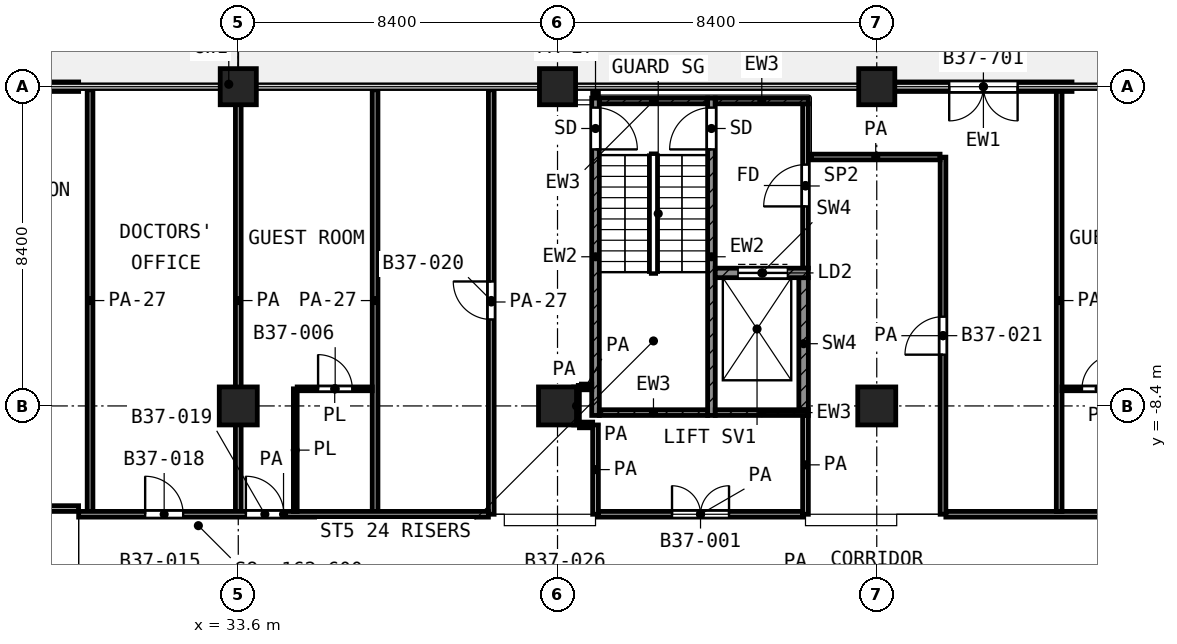
"""IFC4 building model, lengths in metres.
Left out: names, types, materials, properties, quantities, classifications, styles, units other than length and angle.
Written with IfcOpenShell. Run it as: python <this file> out.ifc"""

import sys

from ifc_helpers import new_model, si_unit, direction, frame, frame_2d, origin, origin_2d, place, context, subcontext, project, spatial, rectangle, extrude, element, fill, save


model = new_model("IFC4")
c1 = context("Model", 3, precision=1e-05, world=origin(), true_north=direction((0.0, 1.0)))
c2 = subcontext(c1, "Body", "Model", "MODEL_VIEW")
j1 = project(units=[si_unit("LENGTHUNIT", "METRE"), si_unit("PLANEANGLEUNIT", "RADIAN")], contexts=[c1])
p1 = place(None, origin())
s1 = spatial("IfcSite", under=j1, at=p1, CompositionType="ELEMENT")
p2 = place(p1, origin())
s2 = spatial("IfcBuilding", under=s1, at=p2, CompositionType="ELEMENT")
p3 = place(p2, frame((0.0, 0.0, 162.6)))
s3 = spatial("IfcBuildingStorey", under=s2, at=p3, CompositionType="ELEMENT", Elevation=162.6)
for number, where, z_axis, x_axis in (
    (1, (33.6, 0.0, 0.0), (0.0, 0.0, 1.0), (1.0, 0.0, 0.0)),
    (2, (42.0, 0.0, 0.0), (0.0, 0.0, 1.0), (1.0, 0.0, 0.0)),
    (3, (50.4, 0.0, 0.0), (0.0, 0.0, 1.0), (1.0, 0.0, 0.0)),
):
    element("IfcColumn", number, at=place(p3, frame(where, z_axis=z_axis, x_axis=x_axis)), inside=s3, PredefinedType="COLUMN", context=c2, shape_type="SweptSolid", body=[
        extrude(rectangle(XDim=0.95, YDim=0.95, at=origin_2d()), origin(), (0.0, 0.0, 1.0), 4.2),
    ])
for number, where, z_axis, x_axis in (
    (4, (33.6, -8.4, 0.0), (0.0, 0.0, 1.0), (1.0, 0.0, 0.0)),
    (5, (42.0, -8.4, 0.0), (0.0, 0.0, 1.0), (1.0, 0.0, 0.0)),
    (6, (50.4, -8.4, 0.0), (0.0, 0.0, 1.0), (1.0, 0.0, 0.0)),
):
    element("IfcColumn", number, at=place(p3, frame(where, z_axis=z_axis, x_axis=x_axis)), inside=s3, PredefinedType="COLUMN", context=c2, shape_type="SweptSolid", body=[
        extrude(rectangle(XDim=1.0, YDim=1.0, at=origin_2d()), origin(), (0.0, 0.0, 1.0), 4.2),
    ])
p4 = place(p3, frame((55.538, 0.0, 0.0), z_axis=(0.0, 0.0, 1.0), x_axis=(-1.0, 0.0, 0.0)))
e7 = element("IfcWall", 7, at=p4, inside=s3, PredefinedType="SOLIDWALL", context=c2, shape_type="SweptSolid", body=[
    extrude(rectangle(XDim=4.663, YDim=0.25, at=frame_2d((2.331, 0.0))), origin(), (0.0, 0.0, 1.0), 2.58),
])
p5 = place(p4, frame((1.431, 0.0, 0.0)))
e8 = element("IfcOpeningElement", 8, at=p5, cuts=e7, PredefinedType="OPENING", context=c2, shape_type="SweptSolid", body=[
    extrude(rectangle(XDim=1.8, YDim=2.1, at=frame_2d((0.9, 1.05))), frame((0.0, 0.135, 0.0), z_axis=(0.0, -1.0, 0.0), x_axis=(1.0, 0.0, 0.0)), (0.0, 0.0, 1.0), 0.27),
])
p6 = place(p3, frame((29.4, 0.0, 0.0), z_axis=(0.0, 0.0, 1.0), x_axis=(-1.0, 0.0, 0.0)))
e9 = element("IfcWall", 9, at=p6, inside=s3, PredefinedType="SOLIDWALL", context=c2, shape_type="SweptSolid", body=[
    extrude(rectangle(XDim=3.725, YDim=0.25, at=frame_2d((1.862, 0.0))), origin(), (0.0, 0.0, 1.0), 2.58),
])
p7 = place(p6, frame((0.962, 0.0, 0.0)))
e10 = element("IfcOpeningElement", 10, at=p7, cuts=e9, PredefinedType="OPENING", context=c2, shape_type="SweptSolid", body=[
    extrude(rectangle(XDim=1.8, YDim=2.1, at=frame_2d((0.9, 1.05))), frame((0.0, 0.135, 0.0), z_axis=(0.0, -1.0, 0.0), x_axis=(1.0, 0.0, 0.0)), (0.0, 0.0, 1.0), 0.27),
])
p8 = place(p3, frame((43.0, -8.65, 0.0), z_axis=(0.0, 0.0, 1.0), x_axis=(0.0, 1.0, 0.0)))
e11 = element("IfcWall", 11, at=p8, inside=s3, PredefinedType="SHEAR", context=c2, shape_type="SweptSolid", body=[
    extrude(rectangle(XDim=8.35, YDim=0.2, at=frame_2d((4.175, 0.0))), origin(), (0.0, 0.0, 1.0), 3.6),
])
p9 = place(p8, frame((7.0, 0.0, 0.0)))
e12 = element("IfcOpeningElement", 12, at=p9, cuts=e11, PredefinedType="OPENING", context=c2, shape_type="SweptSolid", body=[
    extrude(rectangle(XDim=1.1, YDim=2.1, at=frame_2d((0.55, 1.05))), frame((0.0, 0.11, 0.0), z_axis=(0.0, -1.0, 0.0), x_axis=(1.0, 0.0, 0.0)), (0.0, 0.0, 1.0), 0.22),
])
p10 = place(p3, frame((46.05, -8.65, 0.0), z_axis=(0.0, 0.0, 1.0), x_axis=(0.0, 1.0, 0.0)))
e13 = element("IfcWall", 13, at=p10, inside=s3, PredefinedType="SHEAR", context=c2, shape_type="SweptSolid", body=[
    extrude(rectangle(XDim=8.35, YDim=0.2, at=frame_2d((4.175, 0.0))), origin(), (0.0, 0.0, 1.0), 3.6),
])
p11 = place(p10, frame((7.0, 0.0, 0.0)))
e14 = element("IfcOpeningElement", 14, at=p11, cuts=e13, PredefinedType="OPENING", context=c2, shape_type="SweptSolid", body=[
    extrude(rectangle(XDim=1.1, YDim=2.1, at=frame_2d((0.55, 1.05))), frame((0.0, 0.11, 0.0), z_axis=(0.0, -1.0, 0.0), x_axis=(1.0, 0.0, 0.0)), (0.0, 0.0, 1.0), 0.22),
])
p12 = place(p3, frame((43.1, -0.375, 0.0), z_axis=(0.0, 0.0, 1.0), x_axis=(1.0, 0.0, 0.0)))
e15 = element("IfcWall", 15, at=p12, inside=s3, PredefinedType="SHEAR", context=c2, shape_type="SweptSolid", body=[
    extrude(rectangle(XDim=2.85, YDim=0.15, at=frame_2d((1.425, 0.0))), origin(), (0.0, 0.0, 1.0), 3.6),
])
p13 = place(p3, frame((46.15, -0.375, 0.0), z_axis=(0.0, 0.0, 1.0), x_axis=(1.0, 0.0, 0.0)))
e16 = element("IfcWall", 16, at=p13, inside=s3, PredefinedType="SHEAR", context=c2, shape_type="SweptSolid", body=[
    extrude(rectangle(XDim=2.45, YDim=0.15, at=frame_2d((1.225, 0.0))), origin(), (0.0, 0.0, 1.0), 3.6),
])
p14 = place(p3, frame((43.1, -8.575, 0.0), z_axis=(0.0, 0.0, 1.0), x_axis=(1.0, 0.0, 0.0)))
e17 = element("IfcWall", 17, at=p14, inside=s3, PredefinedType="SHEAR", context=c2, shape_type="SweptSolid", body=[
    extrude(rectangle(XDim=2.85, YDim=0.15, at=frame_2d((1.425, 0.0))), origin(), (0.0, 0.0, 1.0), 3.6),
])
p15 = place(p3, frame((46.15, -8.575, 0.0), z_axis=(0.0, 0.0, 1.0), x_axis=(1.0, 0.0, 0.0)))
e18 = element("IfcWall", 18, at=p15, inside=s3, PredefinedType="SHEAR", context=c2, shape_type="SweptSolid", body=[
    extrude(rectangle(XDim=2.45, YDim=0.15, at=frame_2d((1.225, 0.0))), origin(), (0.0, 0.0, 1.0), 3.6),
])
p16 = place(p3, frame((46.15, -4.9, 0.0), z_axis=(0.0, 0.0, 1.0), x_axis=(1.0, 0.0, 0.0)))
e19 = element("IfcWall", 19, at=p16, inside=s3, PredefinedType="SHEAR", context=c2, shape_type="SweptSolid", body=[
    extrude(rectangle(XDim=2.45, YDim=0.25, at=frame_2d((1.225, 0.0))), origin(), (0.0, 0.0, 1.0), 3.6),
])
p17 = place(p16, frame((0.6, 0.0, 0.0)))
e20 = element("IfcOpeningElement", 20, at=p17, cuts=e19, PredefinedType="OPENING", context=c2, shape_type="SweptSolid", body=[
    extrude(rectangle(XDim=1.3, YDim=2.1, at=frame_2d((0.65, 1.05))), frame((0.0, 0.135, 0.0), z_axis=(0.0, -1.0, 0.0), x_axis=(1.0, 0.0, 0.0)), (0.0, 0.0, 1.0), 0.27),
])
p18 = place(p3, frame((48.475, -8.5, 0.0), z_axis=(0.0, 0.0, 1.0), x_axis=(0.0, 1.0, 0.0)))
e21 = element("IfcWall", 21, at=p18, inside=s3, PredefinedType="SHEAR", context=c2, shape_type="SweptSolid", body=[
    extrude(rectangle(XDim=3.475, YDim=0.25, at=frame_2d((1.738, 0.0))), origin(), (0.0, 0.0, 1.0), 3.6),
])
p19 = place(p3, frame((48.525, -4.775, 0.0), z_axis=(0.0, 0.0, 1.0), x_axis=(0.0, 1.0, 0.0)))
e22 = element("IfcWall", 22, at=p19, inside=s3, PredefinedType="PARTITIONING", context=c2, shape_type="SweptSolid", body=[
    extrude(rectangle(XDim=4.325, YDim=0.15, at=frame_2d((2.163, 0.0))), origin(), (0.0, 0.0, 1.0), 3.6),
])
p20 = place(p19, frame((1.625, 0.0, 0.0)))
e23 = element("IfcOpeningElement", 23, at=p20, cuts=e22, PredefinedType="OPENING", context=c2, shape_type="SweptSolid", body=[
    extrude(rectangle(XDim=1.1, YDim=2.1, at=frame_2d((0.55, 1.05))), frame((0.0, 0.085, 0.0), z_axis=(0.0, -1.0, 0.0), x_axis=(1.0, 0.0, 0.0)), (0.0, 0.0, 1.0), 0.17),
])
p21 = place(p3, frame((35.15, -7.95, 0.0), z_axis=(0.0, 0.0, 1.0), x_axis=(1.0, 0.0, 0.0)))
e24 = element("IfcWall", 24, at=p21, inside=s3, PredefinedType="PARTITIONING", context=c2, shape_type="SweptSolid", body=[
    extrude(rectangle(XDim=1.975, YDim=0.1, at=frame_2d((0.988, 0.0))), origin(), (0.0, 0.0, 1.0), 3.6),
])
p22 = place(p21, frame((0.55, 0.0, 0.0)))
e25 = element("IfcOpeningElement", 25, at=p22, cuts=e24, PredefinedType="OPENING", context=c2, shape_type="SweptSolid", body=[
    extrude(rectangle(XDim=0.9, YDim=2.1, at=frame_2d((0.45, 1.05))), frame((0.0, 0.06, 0.0), z_axis=(0.0, -1.0, 0.0), x_axis=(1.0, 0.0, 0.0)), (0.0, 0.0, 1.0), 0.12),
])
p23 = place(p3, frame((55.275, -7.95, 0.0), z_axis=(0.0, 0.0, 1.0), x_axis=(1.0, 0.0, 0.0)))
e26 = element("IfcWall", 26, at=p23, inside=s3, PredefinedType="PARTITIONING", context=c2, shape_type="SweptSolid", body=[
    extrude(rectangle(XDim=1.975, YDim=0.1, at=frame_2d((0.988, 0.0))), origin(), (0.0, 0.0, 1.0), 3.6),
])
p24 = place(p23, frame((0.525, 0.0, 0.0)))
e27 = element("IfcOpeningElement", 27, at=p24, cuts=e26, PredefinedType="OPENING", context=c2, shape_type="SweptSolid", body=[
    extrude(rectangle(XDim=0.9, YDim=2.1, at=frame_2d((0.45, 1.05))), frame((0.0, 0.06, 0.0), z_axis=(0.0, -1.0, 0.0), x_axis=(1.0, 0.0, 0.0)), (0.0, 0.0, 1.0), 0.12),
])
p25 = place(p3, frame((35.1, -11.175, 0.0), z_axis=(0.0, 0.0, 1.0), x_axis=(0.0, 1.0, 0.0)))
e28 = element("IfcWall", 28, at=p25, inside=s3, PredefinedType="PARTITIONING", context=c2, shape_type="SweptSolid", body=[
    extrude(rectangle(XDim=3.225, YDim=0.1, at=frame_2d((1.613, 0.0))), origin(), (0.0, 0.0, 1.0), 3.6),
])
p26 = place(p3, frame((29.4, -11.25, 0.0), z_axis=(0.0, 0.0, 1.0), x_axis=(1.0, 0.0, 0.0)))
e29 = element("IfcWall", 29, at=p26, inside=s3, PredefinedType="PARTITIONING", context=c2, shape_type="SweptSolid", body=[
    extrude(rectangle(XDim=10.782, YDim=0.15, at=frame_2d((5.391, 0.0))), origin(), (0.0, 0.0, 1.0), 3.6),
])
p27 = place(p26, frame((1.75, 0.0, 0.0)))
e30 = element("IfcOpeningElement", 30, at=p27, cuts=e29, PredefinedType="OPENING", context=c2, shape_type="SweptSolid", body=[
    extrude(rectangle(XDim=1.0, YDim=2.1, at=frame_2d((0.5, 1.05))), frame((0.0, 0.085, 0.0), z_axis=(0.0, -1.0, 0.0), x_axis=(1.0, 0.0, 0.0)), (0.0, 0.0, 1.0), 0.17),
])
p28 = place(p26, frame((4.4, 0.0, 0.0)))
e31 = element("IfcOpeningElement", 31, at=p28, cuts=e29, PredefinedType="OPENING", context=c2, shape_type="SweptSolid", body=[
    extrude(rectangle(XDim=1.0, YDim=2.1, at=frame_2d((0.5, 1.05))), frame((0.0, 0.085, 0.0), z_axis=(0.0, -1.0, 0.0), x_axis=(1.0, 0.0, 0.0)), (0.0, 0.0, 1.0), 0.17),
])
p29 = place(p3, frame((43.075, -11.25, 0.0), z_axis=(0.0, 0.0, 1.0), x_axis=(1.0, 0.0, 0.0)))
e32 = element("IfcWall", 32, at=p29, inside=s3, PredefinedType="PARTITIONING", context=c2, shape_type="SweptSolid", body=[
    extrude(rectangle(XDim=5.375, YDim=0.15, at=frame_2d((2.688, 0.0))), origin(), (0.0, 0.0, 1.0), 3.6),
])
p30 = place(p29, frame((1.938, 0.0, 0.0)))
e33 = element("IfcOpeningElement", 33, at=p30, cuts=e32, PredefinedType="OPENING", context=c2, shape_type="SweptSolid", body=[
    extrude(rectangle(XDim=1.5, YDim=2.1, at=frame_2d((0.75, 1.05))), frame((0.0, 0.085, 0.0), z_axis=(0.0, -1.0, 0.0), x_axis=(1.0, 0.0, 0.0)), (0.0, 0.0, 1.0), 0.17),
])
p31 = place(p3, frame((52.218, -11.25, 0.0), z_axis=(0.0, 0.0, 1.0), x_axis=(1.0, 0.0, 0.0)))
e34 = element("IfcWall", 34, at=p31, inside=s3, PredefinedType="PARTITIONING", context=c2, shape_type="SweptSolid", body=[
    extrude(rectangle(XDim=14.902, YDim=0.15, at=frame_2d((7.451, 0.0))), origin(), (0.0, 0.0, 1.0), 3.6),
])
p32 = place(p31, frame((5.282, 0.0, 0.0)))
e35 = element("IfcOpeningElement", 35, at=p32, cuts=e34, PredefinedType="OPENING", context=c2, shape_type="SweptSolid", body=[
    extrude(rectangle(XDim=1.0, YDim=2.1, at=frame_2d((0.5, 1.05))), frame((0.0, 0.085, 0.0), z_axis=(0.0, -1.0, 0.0), x_axis=(1.0, 0.0, 0.0)), (0.0, 0.0, 1.0), 0.17),
])
p33 = place(p31, frame((11.482, 0.0, 0.0)))
e36 = element("IfcOpeningElement", 36, at=p33, cuts=e34, PredefinedType="OPENING", context=c2, shape_type="SweptSolid", body=[
    extrude(rectangle(XDim=1.0, YDim=2.1, at=frame_2d((0.5, 1.05))), frame((0.0, 0.085, 0.0), z_axis=(0.0, -1.0, 0.0), x_axis=(1.0, 0.0, 0.0)), (0.0, 0.0, 1.0), 0.17),
])
p34 = place(p31, frame((12.982, 0.0, 0.0)))
e37 = element("IfcOpeningElement", 37, at=p34, cuts=e34, PredefinedType="OPENING", context=c2, shape_type="SweptSolid", body=[
    extrude(rectangle(XDim=1.0, YDim=2.1, at=frame_2d((0.5, 1.05))), frame((0.0, 0.085, 0.0), z_axis=(0.0, -1.0, 0.0), x_axis=(1.0, 0.0, 0.0)), (0.0, 0.0, 1.0), 0.17),
])
p35 = place(p3, frame((24.9, -11.1, 0.0), z_axis=(0.0, 0.0, 1.0), x_axis=(1.0, 0.0, 0.0)))
e38 = element("IfcWall", 38, at=p35, inside=s3, PredefinedType="PARTITIONING", context=c2, shape_type="SweptSolid", body=[
    extrude(rectangle(XDim=4.498, YDim=0.15, at=frame_2d((2.249, 0.0))), origin(), (0.0, 0.0, 1.0), 3.6),
])
p36 = place(p35, frame((1.799, 0.0, 0.0)))
e39 = element("IfcOpeningElement", 39, at=p36, cuts=e38, PredefinedType="OPENING", context=c2, shape_type="SweptSolid", body=[
    extrude(rectangle(XDim=1.2, YDim=2.1, at=frame_2d((0.6, 1.05))), frame((0.0, 0.085, 0.0), z_axis=(0.0, -1.0, 0.0), x_axis=(1.0, 0.0, 0.0)), (0.0, 0.0, 1.0), 0.17),
])
p37 = place(p3, frame((42.577, -8.9, 0.0), z_axis=(0.0, 0.0, 1.0), x_axis=(1.0, 0.0, 0.0)))
e40 = element("IfcWall", 40, at=p37, inside=s3, PredefinedType="PARTITIONING", context=c2, shape_type="SweptSolid", body=[
    extrude(rectangle(XDim=0.348, YDim=0.15, at=frame_2d((0.174, 0.0))), origin(), (0.0, 0.0, 1.0), 3.6),
])
p38 = place(p3, frame((42.577, -7.9, 0.0), z_axis=(0.0, 0.0, 1.0), x_axis=(1.0, 0.0, 0.0)))
e41 = element("IfcWall", 41, at=p38, inside=s3, PredefinedType="PARTITIONING", context=c2, shape_type="SweptSolid", body=[
    extrude(rectangle(XDim=0.323, YDim=0.15, at=frame_2d((0.162, 0.0))), origin(), (0.0, 0.0, 1.0), 3.6),
])
p39 = place(p3, frame((48.68, -1.85, 0.0), z_axis=(0.0, 0.0, 1.0), x_axis=(1.0, 0.0, 0.0)))
e42 = element("IfcWall", 42, at=p39, inside=s3, PredefinedType="PARTITIONING", context=c2, shape_type="SweptSolid", body=[
    extrude(rectangle(XDim=3.386, YDim=0.15, at=frame_2d((1.693, 0.0))), origin(), (0.0, 0.0, 1.0), 3.6),
])
p40 = place(p3, frame((29.7, -11.175, 0.0), z_axis=(0.0, 0.0, 1.0), x_axis=(0.0, 1.0, 0.0)))
e43 = element("IfcWall", 43, at=p40, inside=s3, PredefinedType="PARTITIONING", context=c2, shape_type="SweptSolid", body=[
    extrude(rectangle(XDim=11.095, YDim=0.15, at=frame_2d((5.547, 0.0))), origin(), (0.0, 0.0, 1.0), 2.7),
])
p41 = place(p3, frame((33.6, -11.175, 0.0), z_axis=(0.0, 0.0, 1.0), x_axis=(0.0, 1.0, 0.0)))
e44 = element("IfcWall", 44, at=p41, inside=s3, PredefinedType="PARTITIONING", context=c2, shape_type="SweptSolid", body=[
    extrude(rectangle(XDim=11.095, YDim=0.15, at=frame_2d((5.547, 0.0))), origin(), (0.0, 0.0, 1.0), 3.6),
])
p42 = place(p3, frame((37.2, -11.175, 0.0), z_axis=(0.0, 0.0, 1.0), x_axis=(0.0, 1.0, 0.0)))
e45 = element("IfcWall", 45, at=p42, inside=s3, PredefinedType="PARTITIONING", context=c2, shape_type="SweptSolid", body=[
    extrude(rectangle(XDim=11.095, YDim=0.15, at=frame_2d((5.547, 0.0))), origin(), (0.0, 0.0, 1.0), 2.7),
])
p43 = place(p3, frame((40.257, -11.25, 0.0), z_axis=(0.0, 0.0, 1.0), x_axis=(0.0, 1.0, 0.0)))
e46 = element("IfcWall", 46, at=p43, inside=s3, PredefinedType="PARTITIONING", context=c2, shape_type="SweptSolid", body=[
    extrude(rectangle(XDim=11.17, YDim=0.15, at=frame_2d((5.585, 0.0))), origin(), (0.0, 0.0, 1.0), 2.7),
])
p44 = place(p43, frame((5.125, 0.0, 0.0)))
e47 = element("IfcOpeningElement", 47, at=p44, cuts=e46, PredefinedType="OPENING", context=c2, shape_type="SweptSolid", body=[
    extrude(rectangle(XDim=1.0, YDim=2.1, at=frame_2d((0.5, 1.05))), frame((0.0, 0.085, 0.0), z_axis=(0.0, -1.0, 0.0), x_axis=(1.0, 0.0, 0.0)), (0.0, 0.0, 1.0), 0.17),
])
p45 = place(p3, frame((42.5, -8.899, 0.0), z_axis=(0.0, 0.0, 1.0), x_axis=(0.0, 1.0, 0.0)))
e48 = element("IfcWall", 48, at=p45, inside=s3, PredefinedType="PARTITIONING", context=c2, shape_type="SweptSolid", body=[
    extrude(rectangle(XDim=0.997, YDim=0.15, at=frame_2d((0.499, 0.0))), origin(), (0.0, 0.0, 1.0), 3.6),
])
p46 = place(p3, frame((43.0, -11.25, 0.0), z_axis=(0.0, 0.0, 1.0), x_axis=(0.0, 1.0, 0.0)))
e49 = element("IfcWall", 49, at=p46, inside=s3, PredefinedType="PARTITIONING", context=c2, shape_type="SweptSolid", body=[
    extrude(rectangle(XDim=2.35, YDim=0.15, at=frame_2d((1.175, 0.0))), origin(), (0.0, 0.0, 1.0), 3.6),
])
p47 = place(p3, frame((43.0, -0.27, 0.0), z_axis=(0.0, 0.0, 1.0), x_axis=(0.0, 1.0, 0.0)))
e50 = element("IfcWall", 50, at=p47, inside=s3, PredefinedType="PARTITIONING", context=c2, shape_type="SweptSolid", body=[
    extrude(rectangle(XDim=0.19, YDim=0.15, at=frame_2d((0.095, 0.0))), origin(), (0.0, 0.0, 1.0), 2.7),
])
p48 = place(p3, frame((48.525, -11.25, 0.0), z_axis=(0.0, 0.0, 1.0), x_axis=(0.0, 1.0, 0.0)))
e51 = element("IfcWall", 51, at=p48, inside=s3, PredefinedType="PARTITIONING", context=c2, shape_type="SweptSolid", body=[
    extrude(rectangle(XDim=2.6, YDim=0.15, at=frame_2d((1.3, 0.0))), origin(), (0.0, 0.0, 1.0), 3.6),
])
p49 = place(p3, frame((52.143, -11.25, 0.0), z_axis=(0.0, 0.0, 1.0), x_axis=(0.0, 1.0, 0.0)))
e52 = element("IfcWall", 52, at=p49, inside=s3, PredefinedType="PARTITIONING", context=c2, shape_type="SweptSolid", body=[
    extrude(rectangle(XDim=9.397, YDim=0.15, at=frame_2d((4.698, 0.0))), origin(), (0.0, 0.0, 1.0), 3.6),
])
p50 = place(p49, frame((4.199, 0.0, 0.0)))
e53 = element("IfcOpeningElement", 53, at=p50, cuts=e52, PredefinedType="OPENING", context=c2, shape_type="SweptSolid", body=[
    extrude(rectangle(XDim=1.0, YDim=2.1, at=frame_2d((0.5, 1.05))), frame((0.0, 0.085, 0.0), z_axis=(0.0, -1.0, 0.0), x_axis=(1.0, 0.0, 0.0)), (0.0, 0.0, 1.0), 0.17),
])
p51 = place(p3, frame((55.2, -11.175, 0.0), z_axis=(0.0, 0.0, 1.0), x_axis=(0.0, 1.0, 0.0)))
e54 = element("IfcWall", 54, at=p51, inside=s3, PredefinedType="PARTITIONING", context=c2, shape_type="SweptSolid", body=[
    extrude(rectangle(XDim=11.095, YDim=0.15, at=frame_2d((5.547, 0.0))), origin(), (0.0, 0.0, 1.0), 2.7),
])
p52 = place(p5, origin())
e55 = element("IfcDoor", 55, at=p52, inside=s3, OperationType="DOUBLE_DOOR_SINGLE_SWING", PredefinedType="DOOR", context=c2, shape_type="SweptSolid", body=[
    extrude(rectangle(XDim=1.8, YDim=2.1, at=frame_2d((0.9, 1.05))), frame((0.0, 0.025, 0.0), z_axis=(0.0, -1.0, 0.0), x_axis=(1.0, 0.0, 0.0)), (0.0, 0.0, 1.0), 0.05),
])
fill(e8, e55)
p53 = place(p9, frame((1.1, 0.0, 0.0), z_axis=(0.0, 0.0, 1.0), x_axis=(-1.0, 0.0, 0.0)))
e56 = element("IfcDoor", 56, at=p53, inside=s3, OperationType="SINGLE_SWING_LEFT", PredefinedType="DOOR", context=c2, shape_type="SweptSolid", body=[
    extrude(rectangle(XDim=1.1, YDim=2.1, at=frame_2d((0.55, 1.05))), frame((0.0, 0.025, 0.0), z_axis=(0.0, -1.0, 0.0), x_axis=(1.0, 0.0, 0.0)), (0.0, 0.0, 1.0), 0.05),
])
fill(e12, e56)
p54 = place(p11, origin())
e57 = element("IfcDoor", 57, at=p54, inside=s3, OperationType="SINGLE_SWING_LEFT", PredefinedType="DOOR", context=c2, shape_type="SweptSolid", body=[
    extrude(rectangle(XDim=1.1, YDim=2.1, at=frame_2d((0.55, 1.05))), frame((0.0, 0.025, 0.0), z_axis=(0.0, -1.0, 0.0), x_axis=(1.0, 0.0, 0.0)), (0.0, 0.0, 1.0), 0.05),
])
fill(e14, e57)
p55 = place(p17, origin())
e58 = element("IfcDoor", 58, at=p55, inside=s3, OperationType="DOUBLE_DOOR_SLIDING", PredefinedType="DOOR", context=c2, shape_type="SweptSolid", body=[
    extrude(rectangle(XDim=1.3, YDim=2.1, at=frame_2d((0.65, 1.05))), frame((0.0, 0.025, 0.0), z_axis=(0.0, -1.0, 0.0), x_axis=(1.0, 0.0, 0.0)), (0.0, 0.0, 1.0), 0.05),
])
fill(e20, e58)
p56 = place(p20, origin())
e59 = element("IfcDoor", 59, at=p56, inside=s3, OperationType="SINGLE_SWING_LEFT", PredefinedType="DOOR", context=c2, shape_type="SweptSolid", body=[
    extrude(rectangle(XDim=1.1, YDim=2.1, at=frame_2d((0.55, 1.05))), frame((0.0, 0.025, 0.0), z_axis=(0.0, -1.0, 0.0), x_axis=(1.0, 0.0, 0.0)), (0.0, 0.0, 1.0), 0.05),
])
fill(e23, e59)
p57 = place(p27, origin())
e60 = element("IfcDoor", 60, at=p57, inside=s3, OperationType="SINGLE_SWING_LEFT", PredefinedType="DOOR", context=c2, shape_type="SweptSolid", body=[
    extrude(rectangle(XDim=1.0, YDim=2.1, at=frame_2d((0.5, 1.05))), frame((0.0, 0.025, 0.0), z_axis=(0.0, -1.0, 0.0), x_axis=(1.0, 0.0, 0.0)), (0.0, 0.0, 1.0), 0.05),
])
fill(e30, e60)
p58 = place(p28, origin())
e61 = element("IfcDoor", 61, at=p58, inside=s3, OperationType="SINGLE_SWING_LEFT", PredefinedType="DOOR", context=c2, shape_type="SweptSolid", body=[
    extrude(rectangle(XDim=1.0, YDim=2.1, at=frame_2d((0.5, 1.05))), frame((0.0, 0.025, 0.0), z_axis=(0.0, -1.0, 0.0), x_axis=(1.0, 0.0, 0.0)), (0.0, 0.0, 1.0), 0.05),
])
fill(e31, e61)
p59 = place(p22, origin())
e62 = element("IfcDoor", 62, at=p59, inside=s3, OperationType="SINGLE_SWING_LEFT", PredefinedType="DOOR", context=c2, shape_type="SweptSolid", body=[
    extrude(rectangle(XDim=0.9, YDim=2.1, at=frame_2d((0.45, 1.05))), frame((0.0, 0.025, 0.0), z_axis=(0.0, -1.0, 0.0), x_axis=(1.0, 0.0, 0.0)), (0.0, 0.0, 1.0), 0.05),
])
fill(e25, e62)
p60 = place(p44, origin())
e63 = element("IfcDoor", 63, at=p60, inside=s3, OperationType="SINGLE_SWING_RIGHT", PredefinedType="DOOR", context=c2, shape_type="SweptSolid", body=[
    extrude(rectangle(XDim=1.0, YDim=2.1, at=frame_2d((0.5, 1.05))), frame((0.0, 0.025, 0.0), z_axis=(0.0, -1.0, 0.0), x_axis=(1.0, 0.0, 0.0)), (0.0, 0.0, 1.0), 0.05),
])
fill(e47, e63)
p61 = place(p30, origin())
e64 = element("IfcDoor", 64, at=p61, inside=s3, OperationType="DOUBLE_DOOR_SINGLE_SWING", PredefinedType="DOOR", context=c2, shape_type="SweptSolid", body=[
    extrude(rectangle(XDim=1.5, YDim=2.1, at=frame_2d((0.75, 1.05))), frame((0.0, 0.025, 0.0), z_axis=(0.0, -1.0, 0.0), x_axis=(1.0, 0.0, 0.0)), (0.0, 0.0, 1.0), 0.05),
])
fill(e33, e64)
p62 = place(p50, origin())
e65 = element("IfcDoor", 65, at=p62, inside=s3, OperationType="SINGLE_SWING_LEFT", PredefinedType="DOOR", context=c2, shape_type="SweptSolid", body=[
    extrude(rectangle(XDim=1.0, YDim=2.1, at=frame_2d((0.5, 1.05))), frame((0.0, 0.025, 0.0), z_axis=(0.0, -1.0, 0.0), x_axis=(1.0, 0.0, 0.0)), (0.0, 0.0, 1.0), 0.05),
])
fill(e53, e65)
p63 = place(p24, origin())
e66 = element("IfcDoor", 66, at=p63, inside=s3, OperationType="SINGLE_SWING_RIGHT", PredefinedType="DOOR", context=c2, shape_type="SweptSolid", body=[
    extrude(rectangle(XDim=0.9, YDim=2.1, at=frame_2d((0.45, 1.05))), frame((0.0, 0.025, 0.0), z_axis=(0.0, -1.0, 0.0), x_axis=(1.0, 0.0, 0.0)), (0.0, 0.0, 1.0), 0.05),
])
fill(e27, e66)
save(model, sys.argv[1])
